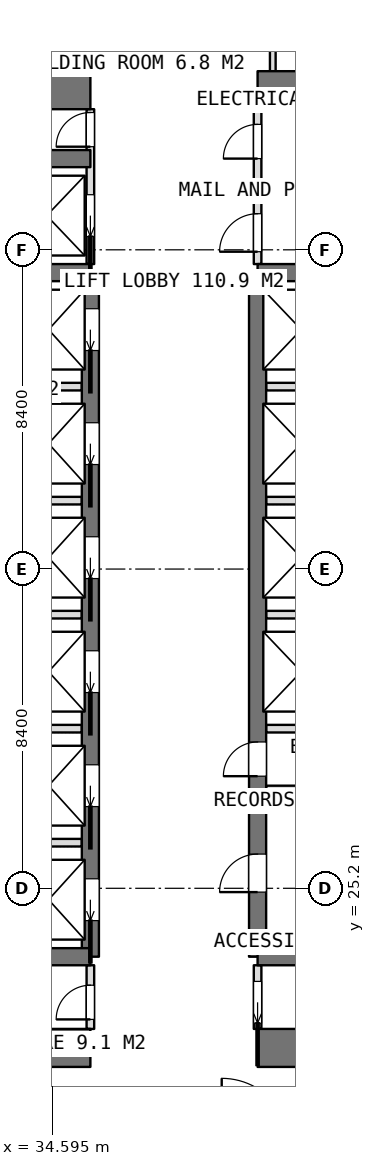
"""IFC4 building model, lengths in metres.
Left out: names, types, materials, properties, quantities, classifications, styles, units other than length and angle.
Written with IfcOpenShell. Run it as: python <this file> out.ifc"""

import sys

from ifc_helpers import new_model, si_unit, direction, frame, frame_2d, origin, place, context, subcontext, project, spatial, rectangle, extrude, element, fill, save


model = new_model("IFC4")
c1 = context("Model", 3, precision=1e-05, world=origin(), true_north=direction((0.0, 1.0)))
c2 = subcontext(c1, "Body", "Model", "MODEL_VIEW")
j1 = project(units=[si_unit("LENGTHUNIT", "METRE"), si_unit("PLANEANGLEUNIT", "RADIAN")], contexts=[c1])
p1 = place(None, origin())
s1 = spatial("IfcSite", under=j1, at=p1, CompositionType="ELEMENT")
p2 = place(p1, origin())
s2 = spatial("IfcBuilding", under=s1, at=p2, CompositionType="ELEMENT")
p3 = place(p2, frame((0.0, 0.0, 144.05)))
s3 = spatial("IfcBuildingStorey", under=s2, at=p3, CompositionType="ELEMENT", Elevation=144.05)
p4 = place(p3, frame((25.2, 21.0, 0.0), z_axis=(0.0, 0.0, 1.0), x_axis=(1.0, 0.0, 0.0)))
e1 = element("IfcWall", 1, at=p4, inside=s3, PredefinedType="SHEAR", context=c2, shape_type="SweptSolid", body=[
    extrude(rectangle(XDim=10.4, YDim=1.0, at=frame_2d((5.2, 0.0))), origin(), (0.0, 0.0, 1.0), 3.75),
])
p5 = place(p3, frame((40.0, 21.0, 0.0), z_axis=(0.0, 0.0, 1.0), x_axis=(1.0, 0.0, 0.0)))
e2 = element("IfcWall", 2, at=p5, inside=s3, PredefinedType="SHEAR", context=c2, shape_type="SweptSolid", body=[
    extrude(rectangle(XDim=10.4, YDim=1.0, at=frame_2d((5.2, 0.0))), origin(), (0.0, 0.0, 1.0), 3.75),
])
p6 = place(p3, frame((25.2, 46.2, 0.0), z_axis=(0.0, 0.0, 1.0), x_axis=(1.0, 0.0, 0.0)))
e3 = element("IfcWall", 3, at=p6, inside=s3, PredefinedType="SHEAR", context=c2, shape_type="SweptSolid", body=[
    extrude(rectangle(XDim=10.4, YDim=1.0, at=frame_2d((5.2, 0.0))), origin(), (0.0, 0.0, 1.0), 3.75),
])
p7 = place(p3, frame((40.0, 46.2, 0.0), z_axis=(0.0, 0.0, 1.0), x_axis=(1.0, 0.0, 0.0)))
e4 = element("IfcWall", 4, at=p7, inside=s3, PredefinedType="SHEAR", context=c2, shape_type="SweptSolid", body=[
    extrude(rectangle(XDim=10.4, YDim=1.0, at=frame_2d((5.2, 0.0))), origin(), (0.0, 0.0, 1.0), 3.75),
])
p8 = place(p3, frame((35.6, 23.4, 0.0), z_axis=(0.0, 0.0, 1.0), x_axis=(0.0, 1.0, 0.0)))
e5 = element("IfcWall", 5, at=p8, inside=s3, PredefinedType="SHEAR", context=c2, shape_type="SweptSolid", body=[
    extrude(rectangle(XDim=18.0, YDim=0.45, at=frame_2d((9.0, 0.0))), origin(), (0.0, 0.0, 1.0), 3.75),
])
p9 = place(p8, frame((0.95, 0.0, 0.0)))
e6 = element("IfcOpeningElement", 6, at=p9, cuts=e5, PredefinedType="OPENING", context=c2, shape_type="SweptSolid", body=[
    extrude(rectangle(XDim=1.1, YDim=2.1, at=frame_2d((0.55, 1.05))), frame((0.0, 0.235, 0.0), z_axis=(0.0, -1.0, 0.0), x_axis=(1.0, 0.0, 0.0)), (0.0, 0.0, 1.0), 0.47),
])
p10 = place(p8, frame((3.95, 0.0, 0.0)))
e7 = element("IfcOpeningElement", 7, at=p10, cuts=e5, PredefinedType="OPENING", context=c2, shape_type="SweptSolid", body=[
    extrude(rectangle(XDim=1.1, YDim=2.1, at=frame_2d((0.55, 1.05))), frame((0.0, 0.235, 0.0), z_axis=(0.0, -1.0, 0.0), x_axis=(1.0, 0.0, 0.0)), (0.0, 0.0, 1.0), 0.47),
])
p11 = place(p8, frame((6.95, 0.0, 0.0)))
e8 = element("IfcOpeningElement", 8, at=p11, cuts=e5, PredefinedType="OPENING", context=c2, shape_type="SweptSolid", body=[
    extrude(rectangle(XDim=1.1, YDim=2.1, at=frame_2d((0.55, 1.05))), frame((0.0, 0.235, 0.0), z_axis=(0.0, -1.0, 0.0), x_axis=(1.0, 0.0, 0.0)), (0.0, 0.0, 1.0), 0.47),
])
p12 = place(p8, frame((9.95, 0.0, 0.0)))
e9 = element("IfcOpeningElement", 9, at=p12, cuts=e5, PredefinedType="OPENING", context=c2, shape_type="SweptSolid", body=[
    extrude(rectangle(XDim=1.1, YDim=2.1, at=frame_2d((0.55, 1.05))), frame((0.0, 0.235, 0.0), z_axis=(0.0, -1.0, 0.0), x_axis=(1.0, 0.0, 0.0)), (0.0, 0.0, 1.0), 0.47),
])
p13 = place(p8, frame((12.95, 0.0, 0.0)))
e10 = element("IfcOpeningElement", 10, at=p13, cuts=e5, PredefinedType="OPENING", context=c2, shape_type="SweptSolid", body=[
    extrude(rectangle(XDim=1.1, YDim=2.1, at=frame_2d((0.55, 1.05))), frame((0.0, 0.235, 0.0), z_axis=(0.0, -1.0, 0.0), x_axis=(1.0, 0.0, 0.0)), (0.0, 0.0, 1.0), 0.47),
])
p14 = place(p8, frame((15.95, 0.0, 0.0)))
e11 = element("IfcOpeningElement", 11, at=p14, cuts=e5, PredefinedType="OPENING", context=c2, shape_type="SweptSolid", body=[
    extrude(rectangle(XDim=1.1, YDim=2.1, at=frame_2d((0.55, 1.05))), frame((0.0, 0.235, 0.0), z_axis=(0.0, -1.0, 0.0), x_axis=(1.0, 0.0, 0.0)), (0.0, 0.0, 1.0), 0.47),
])
p15 = place(p3, frame((40.0, 23.4, 0.0), z_axis=(0.0, 0.0, 1.0), x_axis=(0.0, 1.0, 0.0)))
e12 = element("IfcWall", 12, at=p15, inside=s3, PredefinedType="SHEAR", context=c2, shape_type="SweptSolid", body=[
    extrude(rectangle(XDim=18.0, YDim=0.45, at=frame_2d((9.0, 0.0))), origin(), (0.0, 0.0, 1.0), 3.75),
])
p16 = place(p15, frame((1.7, 0.0, 0.0)))
e13 = element("IfcOpeningElement", 13, at=p16, cuts=e12, PredefinedType="OPENING", context=c2, shape_type="SweptSolid", body=[
    extrude(rectangle(XDim=1.0, YDim=2.1, at=frame_2d((0.5, 1.05))), frame((0.0, 0.235, 0.0), z_axis=(0.0, -1.0, 0.0), x_axis=(1.0, 0.0, 0.0)), (0.0, 0.0, 1.0), 0.47),
])
p17 = place(p15, frame((4.75, 0.0, 0.0)))
e14 = element("IfcOpeningElement", 14, at=p17, cuts=e12, PredefinedType="OPENING", context=c2, shape_type="SweptSolid", body=[
    extrude(rectangle(XDim=0.9, YDim=2.1, at=frame_2d((0.45, 1.05))), frame((0.0, 0.235, 0.0), z_axis=(0.0, -1.0, 0.0), x_axis=(1.0, 0.0, 0.0)), (0.0, 0.0, 1.0), 0.47),
])
for number, where, z_axis, x_axis in (
    (15, (31.8, 23.4, 0.0), (0.0, 0.0, 1.0), (1.0, 0.0, 0.0)),
    (16, (31.8, 41.4, 0.0), (0.0, 0.0, 1.0), (1.0, 0.0, 0.0)),
    (17, (31.8, 44.4, 0.0), (0.0, 0.0, 1.0), (1.0, 0.0, 0.0)),
    (18, (40.0, 23.4, 0.0), (0.0, 0.0, 1.0), (1.0, 0.0, 0.0)),
    (19, (40.0, 41.4, 0.0), (0.0, 0.0, 1.0), (1.0, 0.0, 0.0)),
):
    element("IfcWall", number, at=place(p3, frame(where, z_axis=z_axis, x_axis=x_axis)), inside=s3, PredefinedType="SHEAR", context=c2, shape_type="SweptSolid", body=[
        extrude(rectangle(XDim=3.8, YDim=0.45, at=frame_2d((1.9, 0.0))), origin(), (0.0, 0.0, 1.0), 3.75),
    ])
for number, where, z_axis, x_axis in (
    (20, (32.025, 26.4, 0.0), (0.0, 0.0, 1.0), (1.0, 0.0, 0.0)),
    (21, (32.025, 29.4, 0.0), (0.0, 0.0, 1.0), (1.0, 0.0, 0.0)),
    (22, (32.025, 32.4, 0.0), (0.0, 0.0, 1.0), (1.0, 0.0, 0.0)),
    (23, (32.025, 35.4, 0.0), (0.0, 0.0, 1.0), (1.0, 0.0, 0.0)),
    (24, (32.025, 38.4, 0.0), (0.0, 0.0, 1.0), (1.0, 0.0, 0.0)),
):
    element("IfcWall", number, at=place(p3, frame(where, z_axis=z_axis, x_axis=x_axis)), inside=s3, PredefinedType="PARTITIONING", context=c2, shape_type="SweptSolid", body=[
        extrude(rectangle(XDim=3.35, YDim=0.2, at=frame_2d((1.675, 0.0))), origin(), (0.0, 0.0, 1.0), 3.5),
    ])
for number, where, z_axis, x_axis in (
    (25, (40.225, 29.4, 0.0), (0.0, 0.0, 1.0), (1.0, 0.0, 0.0)),
    (26, (40.225, 32.4, 0.0), (0.0, 0.0, 1.0), (1.0, 0.0, 0.0)),
    (27, (40.225, 35.4, 0.0), (0.0, 0.0, 1.0), (1.0, 0.0, 0.0)),
    (28, (40.225, 38.4, 0.0), (0.0, 0.0, 1.0), (1.0, 0.0, 0.0)),
):
    element("IfcWall", number, at=place(p3, frame(where, z_axis=z_axis, x_axis=x_axis)), inside=s3, PredefinedType="PARTITIONING", context=c2, shape_type="SweptSolid", body=[
        extrude(rectangle(XDim=3.35, YDim=0.2, at=frame_2d((1.675, 0.0))), origin(), (0.0, 0.0, 1.0), 3.5),
    ])
p18 = place(p3, frame((40.0, 21.5, 0.0), z_axis=(0.0, 0.0, 1.0), x_axis=(0.0, 1.0, 0.0)))
e29 = element("IfcWall", 29, at=p18, inside=s3, PredefinedType="PARTITIONING", context=c2, shape_type="SweptSolid", body=[
    extrude(rectangle(XDim=1.675, YDim=0.2, at=frame_2d((0.837, 0.0))), origin(), (0.0, 0.0, 1.0), 3.5),
])
p19 = place(p18, frame((0.15, 0.0, 0.0)))
e30 = element("IfcOpeningElement", 30, at=p19, cuts=e29, PredefinedType="OPENING", context=c2, shape_type="SweptSolid", body=[
    extrude(rectangle(XDim=1.1, YDim=2.1, at=frame_2d((0.55, 1.05))), frame((0.0, 0.11, 0.0), z_axis=(0.0, -1.0, 0.0), x_axis=(1.0, 0.0, 0.0)), (0.0, 0.0, 1.0), 0.22),
])
p20 = place(p3, frame((40.0, 41.625, 0.0), z_axis=(0.0, 0.0, 1.0), x_axis=(0.0, 1.0, 0.0)))
e31 = element("IfcWall", 31, at=p20, inside=s3, PredefinedType="PARTITIONING", context=c2, shape_type="SweptSolid", body=[
    extrude(rectangle(XDim=4.075, YDim=0.2, at=frame_2d((2.038, 0.0))), origin(), (0.0, 0.0, 1.0), 3.5),
])
p21 = place(p20, frame((2.775, 0.0, 0.0)))
e32 = element("IfcOpeningElement", 32, at=p21, cuts=e31, PredefinedType="OPENING", context=c2, shape_type="SweptSolid", body=[
    extrude(rectangle(XDim=0.9, YDim=2.1, at=frame_2d((0.45, 1.05))), frame((0.0, 0.11, 0.0), z_axis=(0.0, -1.0, 0.0), x_axis=(1.0, 0.0, 0.0)), (0.0, 0.0, 1.0), 0.22),
])
p22 = place(p20, frame((0.325, 0.0, 0.0)))
e33 = element("IfcOpeningElement", 33, at=p22, cuts=e31, PredefinedType="OPENING", context=c2, shape_type="SweptSolid", body=[
    extrude(rectangle(XDim=1.0, YDim=2.1, at=frame_2d((0.5, 1.05))), frame((0.0, 0.11, 0.0), z_axis=(0.0, -1.0, 0.0), x_axis=(1.0, 0.0, 0.0)), (0.0, 0.0, 1.0), 0.22),
])
p23 = place(p3, frame((35.6, 41.625, 0.0), z_axis=(0.0, 0.0, 1.0), x_axis=(0.0, 1.0, 0.0)))
e34 = element("IfcWall", 34, at=p23, inside=s3, PredefinedType="PARTITIONING", context=c2, shape_type="SweptSolid", body=[
    extrude(rectangle(XDim=4.075, YDim=0.2, at=frame_2d((2.038, 0.0))), origin(), (0.0, 0.0, 1.0), 3.5),
])
p24 = place(p23, frame((3.088, 0.0, 0.0)))
e35 = element("IfcOpeningElement", 35, at=p24, cuts=e34, PredefinedType="OPENING", context=c2, shape_type="SweptSolid", body=[
    extrude(rectangle(XDim=0.9, YDim=2.1, at=frame_2d((0.45, 1.05))), frame((0.0, 0.11, 0.0), z_axis=(0.0, -1.0, 0.0), x_axis=(1.0, 0.0, 0.0)), (0.0, 0.0, 1.0), 0.22),
])
p25 = place(p23, frame((0.725, 0.0, 0.0)))
e36 = element("IfcOpeningElement", 36, at=p25, cuts=e34, PredefinedType="OPENING", context=c2, shape_type="SweptSolid", body=[
    extrude(rectangle(XDim=1.1, YDim=2.1, at=frame_2d((0.55, 1.05))), frame((0.0, 0.11, 0.0), z_axis=(0.0, -1.0, 0.0), x_axis=(1.0, 0.0, 0.0)), (0.0, 0.0, 1.0), 0.22),
])
p26 = place(p3, frame((35.6, 21.5, 0.0), z_axis=(0.0, 0.0, 1.0), x_axis=(0.0, 1.0, 0.0)))
e37 = element("IfcWall", 37, at=p26, inside=s3, PredefinedType="PARTITIONING", context=c2, shape_type="SweptSolid", body=[
    extrude(rectangle(XDim=1.675, YDim=0.2, at=frame_2d((0.837, 0.0))), origin(), (0.0, 0.0, 1.0), 3.5),
])
p27 = place(p26, frame((0.25, 0.0, 0.0)))
e38 = element("IfcOpeningElement", 38, at=p27, cuts=e37, PredefinedType="OPENING", context=c2, shape_type="SweptSolid", body=[
    extrude(rectangle(XDim=0.9, YDim=2.1, at=frame_2d((0.45, 1.05))), frame((0.0, 0.11, 0.0), z_axis=(0.0, -1.0, 0.0), x_axis=(1.0, 0.0, 0.0)), (0.0, 0.0, 1.0), 0.22),
])
p28 = place(p3, frame((40.225, 27.8, 0.0), z_axis=(0.0, 0.0, 1.0), x_axis=(1.0, 0.0, 0.0)))
e39 = element("IfcWall", 39, at=p28, inside=s3, PredefinedType="PARTITIONING", context=c2, shape_type="SweptSolid", body=[
    extrude(rectangle(XDim=3.35, YDim=0.2, at=frame_2d((1.675, 0.0))), origin(), (0.0, 0.0, 1.0), 3.5),
])
p29 = place(p3, frame((40.0, 43.5, 0.0), z_axis=(0.0, 0.0, 1.0), x_axis=(1.0, 0.0, 0.0)))
e40 = element("IfcWall", 40, at=p29, inside=s3, PredefinedType="PARTITIONING", context=c2, shape_type="SweptSolid", body=[
    extrude(rectangle(XDim=3.575, YDim=0.2, at=frame_2d((1.788, 0.0))), origin(), (0.0, 0.0, 1.0), 3.5),
])
for number, where, z_axis, x_axis in (
    (41, (40.4, 46.7, 0.0), (0.0, 0.0, 1.0), (0.0, 1.0, 0.0)),
    (42, (35.2, 46.7, 0.0), (0.0, 0.0, 1.0), (0.0, 1.0, 0.0)),
):
    element("IfcWall", number, at=place(p3, frame(where, z_axis=z_axis, x_axis=x_axis)), inside=s3, PredefinedType="PARTITIONING", context=c2, shape_type="SweptSolid", body=[
        extrude(rectangle(XDim=2.625, YDim=0.15, at=frame_2d((1.312, 0.0))), origin(), (0.0, 0.0, 1.0), 3.5),
    ])
p30 = place(p19, origin())
e43 = element("IfcDoor", 43, at=p30, inside=s3, OperationType="SLIDING_TO_LEFT", PredefinedType="DOOR", context=c2, shape_type="SweptSolid", body=[
    extrude(rectangle(XDim=1.1, YDim=2.1, at=frame_2d((0.55, 1.05))), frame((0.0, 0.025, 0.0), z_axis=(0.0, -1.0, 0.0), x_axis=(1.0, 0.0, 0.0)), (0.0, 0.0, 1.0), 0.05),
])
fill(e30, e43)
p31 = place(p27, origin())
e44 = element("IfcDoor", 44, at=p31, inside=s3, OperationType="SINGLE_SWING_LEFT", PredefinedType="DOOR", context=c2, shape_type="SweptSolid", body=[
    extrude(rectangle(XDim=0.9, YDim=2.1, at=frame_2d((0.45, 1.05))), frame((0.0, 0.025, 0.0), z_axis=(0.0, -1.0, 0.0), x_axis=(1.0, 0.0, 0.0)), (0.0, 0.0, 1.0), 0.05),
])
fill(e38, e44)
p32 = place(p21, origin())
e45 = element("IfcDoor", 45, at=p32, inside=s3, OperationType="SINGLE_SWING_LEFT", PredefinedType="DOOR", context=c2, shape_type="SweptSolid", body=[
    extrude(rectangle(XDim=0.9, YDim=2.1, at=frame_2d((0.45, 1.05))), frame((0.0, 0.025, 0.0), z_axis=(0.0, -1.0, 0.0), x_axis=(1.0, 0.0, 0.0)), (0.0, 0.0, 1.0), 0.05),
])
fill(e32, e45)
p33 = place(p22, origin())
e46 = element("IfcDoor", 46, at=p33, inside=s3, OperationType="SINGLE_SWING_LEFT", PredefinedType="DOOR", context=c2, shape_type="SweptSolid", body=[
    extrude(rectangle(XDim=1.0, YDim=2.1, at=frame_2d((0.5, 1.05))), frame((0.0, 0.025, 0.0), z_axis=(0.0, -1.0, 0.0), x_axis=(1.0, 0.0, 0.0)), (0.0, 0.0, 1.0), 0.05),
])
fill(e33, e46)
p34 = place(p16, origin())
e47 = element("IfcDoor", 47, at=p34, inside=s3, OperationType="SINGLE_SWING_LEFT", PredefinedType="DOOR", context=c2, shape_type="SweptSolid", body=[
    extrude(rectangle(XDim=1.0, YDim=2.1, at=frame_2d((0.5, 1.05))), frame((0.0, 0.025, 0.0), z_axis=(0.0, -1.0, 0.0), x_axis=(1.0, 0.0, 0.0)), (0.0, 0.0, 1.0), 0.05),
])
fill(e13, e47)
p35 = place(p17, origin())
e48 = element("IfcDoor", 48, at=p35, inside=s3, OperationType="SINGLE_SWING_LEFT", PredefinedType="DOOR", context=c2, shape_type="SweptSolid", body=[
    extrude(rectangle(XDim=0.9, YDim=2.1, at=frame_2d((0.45, 1.05))), frame((0.0, 0.025, 0.0), z_axis=(0.0, -1.0, 0.0), x_axis=(1.0, 0.0, 0.0)), (0.0, 0.0, 1.0), 0.05),
])
fill(e14, e48)
p36 = place(p24, origin())
e49 = element("IfcDoor", 49, at=p36, inside=s3, OperationType="SINGLE_SWING_LEFT", PredefinedType="DOOR", context=c2, shape_type="SweptSolid", body=[
    extrude(rectangle(XDim=0.9, YDim=2.1, at=frame_2d((0.45, 1.05))), frame((0.0, 0.025, 0.0), z_axis=(0.0, -1.0, 0.0), x_axis=(1.0, 0.0, 0.0)), (0.0, 0.0, 1.0), 0.05),
])
fill(e35, e49)
p37 = place(p9, origin())
e50 = element("IfcDoor", 50, at=p37, inside=s3, OperationType="SLIDING_TO_LEFT", PredefinedType="USERDEFINED", context=c2, shape_type="SweptSolid", body=[
    extrude(rectangle(XDim=1.1, YDim=2.1, at=frame_2d((0.55, 1.05))), frame((0.0, 0.025, 0.0), z_axis=(0.0, -1.0, 0.0), x_axis=(1.0, 0.0, 0.0)), (0.0, 0.0, 1.0), 0.05),
])
fill(e6, e50)
p38 = place(p10, origin())
e51 = element("IfcDoor", 51, at=p38, inside=s3, OperationType="SLIDING_TO_LEFT", PredefinedType="USERDEFINED", context=c2, shape_type="SweptSolid", body=[
    extrude(rectangle(XDim=1.1, YDim=2.1, at=frame_2d((0.55, 1.05))), frame((0.0, 0.025, 0.0), z_axis=(0.0, -1.0, 0.0), x_axis=(1.0, 0.0, 0.0)), (0.0, 0.0, 1.0), 0.05),
])
fill(e7, e51)
p39 = place(p11, origin())
e52 = element("IfcDoor", 52, at=p39, inside=s3, OperationType="SLIDING_TO_LEFT", PredefinedType="USERDEFINED", context=c2, shape_type="SweptSolid", body=[
    extrude(rectangle(XDim=1.1, YDim=2.1, at=frame_2d((0.55, 1.05))), frame((0.0, 0.025, 0.0), z_axis=(0.0, -1.0, 0.0), x_axis=(1.0, 0.0, 0.0)), (0.0, 0.0, 1.0), 0.05),
])
fill(e8, e52)
p40 = place(p12, origin())
e53 = element("IfcDoor", 53, at=p40, inside=s3, OperationType="SLIDING_TO_LEFT", PredefinedType="USERDEFINED", context=c2, shape_type="SweptSolid", body=[
    extrude(rectangle(XDim=1.1, YDim=2.1, at=frame_2d((0.55, 1.05))), frame((0.0, 0.025, 0.0), z_axis=(0.0, -1.0, 0.0), x_axis=(1.0, 0.0, 0.0)), (0.0, 0.0, 1.0), 0.05),
])
fill(e9, e53)
p41 = place(p13, origin())
e54 = element("IfcDoor", 54, at=p41, inside=s3, OperationType="SLIDING_TO_LEFT", PredefinedType="USERDEFINED", context=c2, shape_type="SweptSolid", body=[
    extrude(rectangle(XDim=1.1, YDim=2.1, at=frame_2d((0.55, 1.05))), frame((0.0, 0.025, 0.0), z_axis=(0.0, -1.0, 0.0), x_axis=(1.0, 0.0, 0.0)), (0.0, 0.0, 1.0), 0.05),
])
fill(e10, e54)
p42 = place(p14, origin())
e55 = element("IfcDoor", 55, at=p42, inside=s3, OperationType="SLIDING_TO_LEFT", PredefinedType="USERDEFINED", context=c2, shape_type="SweptSolid", body=[
    extrude(rectangle(XDim=1.1, YDim=2.1, at=frame_2d((0.55, 1.05))), frame((0.0, 0.025, 0.0), z_axis=(0.0, -1.0, 0.0), x_axis=(1.0, 0.0, 0.0)), (0.0, 0.0, 1.0), 0.05),
])
fill(e11, e55)
p43 = place(p25, origin())
e56 = element("IfcDoor", 56, at=p43, inside=s3, OperationType="SLIDING_TO_LEFT", PredefinedType="USERDEFINED", context=c2, shape_type="SweptSolid", body=[
    extrude(rectangle(XDim=1.1, YDim=2.1, at=frame_2d((0.55, 1.05))), frame((0.0, 0.025, 0.0), z_axis=(0.0, -1.0, 0.0), x_axis=(1.0, 0.0, 0.0)), (0.0, 0.0, 1.0), 0.05),
])
fill(e36, e56)
save(model, sys.argv[1])
